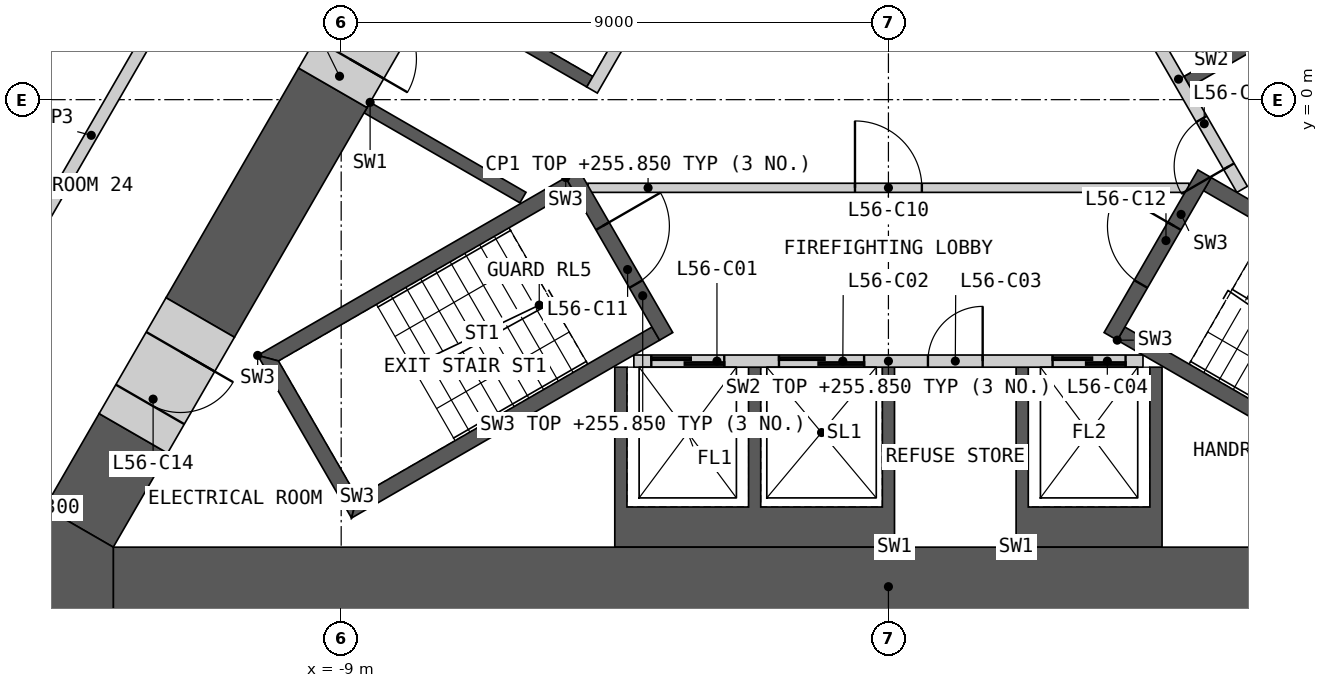
"""IFC4 building model, lengths in metres.
Left out: names, types, materials, properties, quantities, classifications, styles, units other than length and angle.
Written with IfcOpenShell. Run it as: python <this file> out.ifc"""

import sys

from ifc_helpers import new_model, si_unit, direction, frame, frame_2d, origin, place, context, subcontext, project, spatial, polyline, rectangle, outline, extrude, element, fill, save


model = new_model("IFC4")
c1 = context("Model", 3, precision=1e-05, world=origin(), true_north=direction((0.0, 1.0)))
c2 = subcontext(c1, "Body", "Model", "MODEL_VIEW")
j1 = project(units=[si_unit("LENGTHUNIT", "METRE"), si_unit("PLANEANGLEUNIT", "RADIAN")], contexts=[c1])
p1 = place(None, origin())
s1 = spatial("IfcSite", under=j1, at=p1, CompositionType="ELEMENT")
p2 = place(p1, origin())
s2 = spatial("IfcBuilding", under=s1, at=p2, CompositionType="ELEMENT")
p3 = place(p2, frame((0.0, 0.0, 252.6)))
s3 = spatial("IfcBuildingStorey", under=s2, at=p3, CompositionType="ELEMENT", Elevation=252.6)
p4 = place(p3, origin())
e1 = element("IfcWall", 1, at=p4, inside=s3, PredefinedType="SHEAR", context=c2, shape_type="SweptSolid", body=[
    extrude(outline(polyline([(0.1, -7.36), (-4.5, -7.36), (-4.5, -4.4), (-4.3, -4.4), (-4.3, -6.7), (-2.3, -6.7), (-2.3, -4.4), (-2.1, -4.4), (-2.1, -6.7), (-0.1, -6.7), (-0.1, -4.4), (0.1, -4.4), (0.1, -7.36)])), origin(), (0.0, 0.0, 1.0), 3.25),
])
p5 = place(p3, origin())
e2 = element("IfcWall", 2, at=p5, inside=s3, PredefinedType="SHEAR", context=c2, shape_type="SweptSolid", body=[
    extrude(outline(polyline([(2.1, -7.36), (2.1, -4.4), (2.3, -4.4), (2.3, -6.7), (4.3, -6.7), (4.3, -4.4), (4.5, -4.4), (4.5, -7.36), (2.1, -7.36)])), origin(), (0.0, 0.0, 1.0), 3.25),
])
p6 = place(p3, frame((-4.187, -4.3, 0.0), z_axis=(0.0, 0.0, 1.0), x_axis=(1.0, 0.0, 0.0)))
e3 = element("IfcWall", 3, at=p6, inside=s3, PredefinedType="SOLIDWALL", context=c2, shape_type="SweptSolid", body=[
    extrude(rectangle(XDim=8.373, YDim=0.2, at=frame_2d((4.187, 0.0))), origin(), (0.0, 0.0, 1.0), 3.25),
])
p7 = place(p6, frame((0.287, 0.0, 0.0)))
e4 = element("IfcOpeningElement", 4, at=p7, cuts=e3, PredefinedType="OPENING", context=c2, shape_type="SweptSolid", body=[
    extrude(rectangle(XDim=1.2, YDim=2.1, at=frame_2d((0.6, 1.05))), frame((0.0, 0.11, 0.0), z_axis=(0.0, -1.0, 0.0), x_axis=(1.0, 0.0, 0.0)), (0.0, 0.0, 1.0), 0.22),
])
p8 = place(p6, frame((2.387, 0.0, 0.0)))
e5 = element("IfcOpeningElement", 5, at=p8, cuts=e3, PredefinedType="OPENING", context=c2, shape_type="SweptSolid", body=[
    extrude(rectangle(XDim=1.4, YDim=2.1, at=frame_2d((0.7, 1.05))), frame((0.0, 0.11, 0.0), z_axis=(0.0, -1.0, 0.0), x_axis=(1.0, 0.0, 0.0)), (0.0, 0.0, 1.0), 0.22),
])
p9 = place(p6, frame((4.837, 0.0, 0.0)))
e6 = element("IfcOpeningElement", 6, at=p9, cuts=e3, PredefinedType="OPENING", context=c2, shape_type="SweptSolid", body=[
    extrude(rectangle(XDim=0.9, YDim=2.1, at=frame_2d((0.45, 1.05))), frame((0.0, 0.11, 0.0), z_axis=(0.0, -1.0, 0.0), x_axis=(1.0, 0.0, 0.0)), (0.0, 0.0, 1.0), 0.22),
])
p10 = place(p6, frame((6.887, 0.0, 0.0)))
e7 = element("IfcOpeningElement", 7, at=p10, cuts=e3, PredefinedType="OPENING", context=c2, shape_type="SweptSolid", body=[
    extrude(rectangle(XDim=1.2, YDim=2.1, at=frame_2d((0.6, 1.05))), frame((0.0, 0.11, 0.0), z_axis=(0.0, -1.0, 0.0), x_axis=(1.0, 0.0, 0.0)), (0.0, 0.0, 1.0), 0.22),
])
p11 = place(p3, origin())
e8 = element("IfcWall", 8, at=p11, inside=s3, PredefinedType="SHEAR", context=c2, shape_type="SweptSolid", body=[
    extrude(outline(polyline([(7.524, 1.688), (7.131, 1.461), (4.96, 0.208), (4.861, 0.381), (6.852, 1.531), (4.752, 5.169), (2.76, 4.019), (2.66, 4.192), (4.652, 5.342), (3.652, 7.074), (1.66, 5.924), (1.561, 6.097), (3.731, 7.35), (4.124, 7.577), (7.524, 1.688)])), origin(), (0.0, 0.0, 1.0), 3.25),
])
p12 = place(p3, frame((5.817, -1.476, 0.0), z_axis=(0.0, 0.0, 1.0), x_axis=(-0.500002616675, 0.866023893041, 0.0)))
e9 = element("IfcWall", 9, at=p12, inside=s3, PredefinedType="SOLIDWALL", context=c2, shape_type="SweptSolid", body=[
    extrude(rectangle(XDim=8.373, YDim=0.2, at=frame_2d((4.187, 0.0))), origin(), (0.0, 0.0, 1.0), 3.25),
])
p13 = place(p12, frame((0.437, 0.0, 0.0)))
e10 = element("IfcOpeningElement", 10, at=p13, cuts=e9, PredefinedType="OPENING", context=c2, shape_type="SweptSolid", body=[
    extrude(rectangle(XDim=0.9, YDim=2.1, at=frame_2d((0.45, 1.05))), frame((0.0, 0.11, 0.0), z_axis=(0.0, -1.0, 0.0), x_axis=(1.0, 0.0, 0.0)), (0.0, 0.0, 1.0), 0.22),
])
p14 = place(p12, frame((3.737, 0.0, 0.0)))
e11 = element("IfcOpeningElement", 11, at=p14, cuts=e9, PredefinedType="OPENING", context=c2, shape_type="SweptSolid", body=[
    extrude(rectangle(XDim=0.9, YDim=2.1, at=frame_2d((0.45, 1.05))), frame((0.0, 0.11, 0.0), z_axis=(0.0, -1.0, 0.0), x_axis=(1.0, 0.0, 0.0)), (0.0, 0.0, 1.0), 0.22),
])
p15 = place(p12, frame((6.937, 0.0, 0.0)))
e12 = element("IfcOpeningElement", 12, at=p15, cuts=e9, PredefinedType="OPENING", context=c2, shape_type="SweptSolid", body=[
    extrude(rectangle(XDim=1.1, YDim=2.1, at=frame_2d((0.55, 1.05))), frame((0.0, 0.11, 0.0), z_axis=(0.0, -1.0, 0.0), x_axis=(1.0, 0.0, 0.0)), (0.0, 0.0, 1.0), 0.22),
])
p16 = place(p3, origin())
e13 = element("IfcWall", 13, at=p16, inside=s3, PredefinedType="SHEAR", context=c2, shape_type="SweptSolid", body=[
    extrude(outline(polyline([(-7.524, 1.688), (-4.124, 7.577), (-3.731, 7.35), (-1.561, 6.097), (-1.66, 5.924), (-3.652, 7.074), (-4.652, 5.342), (-2.66, 4.192), (-2.76, 4.019), (-4.752, 5.169), (-5.752, 3.437), (-3.76, 2.287), (-3.861, 2.113), (-5.852, 3.263), (-6.852, 1.531), (-4.861, 0.381), (-4.96, 0.208), (-7.131, 1.461), (-7.524, 1.688)])), origin(), (0.0, 0.0, 1.0), 3.25),
])
p17 = place(p3, origin())
e14 = element("IfcWall", 14, at=p17, inside=s3, PredefinedType="SHEAR", context=c2, shape_type="SweptSolid", body=[
    extrude(outline(polyline([(-8.524, -0.044), (-8.131, -0.271), (-5.96, -1.524), (-6.061, -1.697), (-8.231, -0.444), (-8.624, -0.217), (-8.524, -0.044)])), origin(), (0.0, 0.0, 1.0), 3.25),
])
p18 = place(p3, frame((-1.631, 5.776, 0.0), z_axis=(0.0, 0.0, 1.0), x_axis=(-0.499992876559, -0.866029516466, 0.0)))
e15 = element("IfcWall", 15, at=p18, inside=s3, PredefinedType="SOLIDWALL", context=c2, shape_type="SweptSolid", body=[
    extrude(rectangle(XDim=6.486, YDim=0.2, at=frame_2d((3.243, 0.0))), origin(), (0.0, 0.0, 1.0), 3.25),
])
p19 = place(p18, frame((0.337, 0.0, 0.0)))
e16 = element("IfcOpeningElement", 16, at=p19, cuts=e15, PredefinedType="OPENING", context=c2, shape_type="SweptSolid", body=[
    extrude(rectangle(XDim=1.1, YDim=2.1, at=frame_2d((0.55, 1.05))), frame((0.0, 0.11, 0.0), z_axis=(0.0, -1.0, 0.0), x_axis=(1.0, 0.0, 0.0)), (0.0, 0.0, 1.0), 0.22),
])
p20 = place(p18, frame((2.537, 0.0, 0.0)))
e17 = element("IfcOpeningElement", 17, at=p20, cuts=e15, PredefinedType="OPENING", context=c2, shape_type="SweptSolid", body=[
    extrude(rectangle(XDim=1.1, YDim=2.1, at=frame_2d((0.55, 1.05))), frame((0.0, 0.11, 0.0), z_axis=(0.0, -1.0, 0.0), x_axis=(1.0, 0.0, 0.0)), (0.0, 0.0, 1.0), 0.22),
])
p21 = place(p3, frame((-4.941, -1.45, 0.0), z_axis=(0.0, 0.0, 1.0), x_axis=(1.0, 0.0, 0.0)))
e18 = element("IfcWall", 18, at=p21, inside=s3, PredefinedType="PARTITIONING", context=c2, shape_type="SweptSolid", body=[
    extrude(rectangle(XDim=9.882, YDim=0.15, at=frame_2d((4.941, 0.0))), origin(), (0.0, 0.0, 1.0), 3.25),
])
p22 = place(p21, frame((4.391, 0.0, 0.0)))
e19 = element("IfcOpeningElement", 19, at=p22, cuts=e18, PredefinedType="OPENING", context=c2, shape_type="SweptSolid", body=[
    extrude(rectangle(XDim=1.1, YDim=2.1, at=frame_2d((0.55, 1.05))), frame((0.0, 0.085, 0.0), z_axis=(0.0, -1.0, 0.0), x_axis=(1.0, 0.0, 0.0)), (0.0, 0.0, 1.0), 0.17),
])
p23 = place(p3, origin())
e20 = element("IfcWall", 20, at=p23, inside=s3, PredefinedType="SHEAR", context=c2, shape_type="SweptSolid", body=[
    extrude(outline(polyline([(-5.307, -1.281), (-10.374, -4.206), (-10.032, -4.298), (-5.182, -1.498), (-5.307, -1.281)])), origin(), (0.0, 0.0, 1.0), 3.25),
])
p24 = place(p3, origin())
e21 = element("IfcWall", 21, at=p24, inside=s3, PredefinedType="SHEAR", context=c2, shape_type="SweptSolid", body=[
    extrude(outline(polyline([(-10.374, -4.206), (-8.83, -6.881), (-8.738, -6.539), (-10.032, -4.298), (-10.374, -4.206)])), origin(), (0.0, 0.0, 1.0), 3.25),
])
p25 = place(p3, origin())
e22 = element("IfcWall", 22, at=p25, inside=s3, PredefinedType="SHEAR", context=c2, shape_type="SweptSolid", body=[
    extrude(outline(polyline([(-8.738, -6.539), (-8.83, -6.881), (-3.763, -3.956), (-3.888, -3.739), (-8.738, -6.539)])), origin(), (0.0, 0.0, 1.0), 3.25),
])
p26 = place(p3, frame((-5.199, -1.219, 0.0), z_axis=(0.0, 0.0, 1.0), x_axis=(0.499982516597, -0.866035497597, 0.0)))
e23 = element("IfcWall", 23, at=p26, inside=s3, PredefinedType="SHEAR", context=c2, shape_type="SweptSolid", body=[
    extrude(rectangle(XDim=3.088, YDim=0.25, at=frame_2d((1.544, 0.0))), origin(), (0.0, 0.0, 1.0), 3.25),
])
p27 = place(p26, frame((0.994, 0.0, 0.0)))
e24 = element("IfcOpeningElement", 24, at=p27, cuts=e23, PredefinedType="OPENING", context=c2, shape_type="SweptSolid", body=[
    extrude(rectangle(XDim=1.1, YDim=2.1, at=frame_2d((0.55, 1.05))), frame((0.0, 0.135, 0.0), z_axis=(0.0, -1.0, 0.0), x_axis=(1.0, 0.0, 0.0)), (0.0, 0.0, 1.0), 0.27),
])
p28 = place(p3, origin())
e25 = element("IfcWall", 25, at=p28, inside=s3, PredefinedType="SHEAR", context=c2, shape_type="SweptSolid", body=[
    extrude(outline(polyline([(3.763, -3.956), (8.83, -6.881), (8.738, -6.539), (3.888, -3.739), (3.763, -3.956)])), origin(), (0.0, 0.0, 1.0), 3.25),
])
p29 = place(p3, origin())
e26 = element("IfcWall", 26, at=p29, inside=s3, PredefinedType="SHEAR", context=c2, shape_type="SweptSolid", body=[
    extrude(outline(polyline([(10.032, -4.298), (10.374, -4.206), (5.307, -1.281), (5.182, -1.498), (10.032, -4.298)])), origin(), (0.0, 0.0, 1.0), 3.25),
])
p30 = place(p3, frame((3.655, -3.893, 0.0), z_axis=(0.0, 0.0, 1.0), x_axis=(0.499982516597, 0.866035497597, 0.0)))
e27 = element("IfcWall", 27, at=p30, inside=s3, PredefinedType="SHEAR", context=c2, shape_type="SweptSolid", body=[
    extrude(rectangle(XDim=3.088, YDim=0.25, at=frame_2d((1.544, 0.0))), origin(), (0.0, 0.0, 1.0), 3.25),
])
p31 = place(p30, frame((0.994, 0.0, 0.0)))
e28 = element("IfcOpeningElement", 28, at=p31, cuts=e27, PredefinedType="OPENING", context=c2, shape_type="SweptSolid", body=[
    extrude(rectangle(XDim=1.1, YDim=2.1, at=frame_2d((0.55, 1.05))), frame((0.0, 0.135, 0.0), z_axis=(0.0, -1.0, 0.0), x_axis=(1.0, 0.0, 0.0)), (0.0, 0.0, 1.0), 0.27),
])
p32 = place(p3, frame((-12.748, -8.01, 0.0), z_axis=(0.0, 0.0, 1.0), x_axis=(1.0, 0.0, 0.0)))
e29 = element("IfcWall", 29, at=p32, inside=s3, PredefinedType="SHEAR", context=c2, shape_type="SweptSolid", body=[
    extrude(rectangle(XDim=25.497, YDim=1.3, at=frame_2d((12.748, 0.0))), origin(), (0.0, 0.0, 1.0), 3.25),
])
p33 = place(p3, frame((10.081, -1.441, 0.0), z_axis=(0.0, 0.0, 1.0), x_axis=(-0.500006109471, 0.866021876451, 0.0)))
e30 = element("IfcWall", 30, at=p33, inside=s3, PredefinedType="SHEAR", context=c2, shape_type="SweptSolid", body=[
    extrude(rectangle(XDim=11.672, YDim=1.3, at=frame_2d((5.836, 0.0))), origin(), (0.0, 0.0, 1.0), 3.25),
])
p34 = place(p3, frame((-9.137, 0.195, 0.0), z_axis=(0.0, 0.0, 1.0), x_axis=(-0.499985697398, -0.866033661238, 0.0)))
e31 = element("IfcWall", 31, at=p34, inside=s3, PredefinedType="SHEAR", context=c2, shape_type="SweptSolid", body=[
    extrude(rectangle(XDim=4.362, YDim=1.3, at=frame_2d((2.181, 0.0))), origin(), (0.0, 0.0, 1.0), 3.25),
])
p35 = place(p3, frame((-12.418, -5.488, 0.0), z_axis=(0.0, 0.0, 1.0), x_axis=(-0.499931460552, -0.866064971437, 0.0)))
e32 = element("IfcWall", 32, at=p35, inside=s3, PredefinedType="SHEAR", context=c2, shape_type="SweptSolid", body=[
    extrude(rectangle(XDim=1.786, YDim=1.3, at=frame_2d((0.893, 0.0))), origin(), (0.0, 0.0, 1.0), 3.25),
])
p36 = place(p3, origin())
e33 = element("IfcWall", 33, at=p36, inside=s3, PredefinedType="SHEAR", context=c2, shape_type="SweptSolid", body=[
    extrude(outline(polyline([(-13.874, -6.71), (-12.748, -7.36), (-12.748, -8.66), (-15.0, -8.66), (-13.874, -6.71)])), origin(), (0.0, 0.0, 1.0), 3.25),
])
p37 = place(p3, frame((-11.318, -3.583, 0.0), z_axis=(0.0, 0.0, 1.0), x_axis=(-0.50002983664, -0.866008176907, 0.0)))
e34 = element("IfcWall", 34, at=p37, inside=s3, PredefinedType="SHEAR", context=c2, shape_type="SweptSolid", body=[
    extrude(rectangle(XDim=2.2, YDim=1.3, at=frame_2d((1.1, 0.0))), origin(), (0.0, 0.0, 1.0), 3.25),
])
p38 = place(p37, frame((0.65, 0.0, 0.0)))
e35 = element("IfcOpeningElement", 35, at=p38, cuts=e34, PredefinedType="OPENING", context=c2, shape_type="SweptSolid", body=[
    extrude(rectangle(XDim=1.0, YDim=2.1, at=frame_2d((0.5, 1.05))), frame((0.0, 0.66, 0.0), z_axis=(0.0, -1.0, 0.0), x_axis=(1.0, 0.0, 0.0)), (0.0, 0.0, 1.0), 1.32),
])
p39 = place(p3, frame((-8.037, 2.1, 0.0), z_axis=(0.0, 0.0, 1.0), x_axis=(-0.50002983664, -0.866008176907, 0.0)))
e36 = element("IfcWall", 36, at=p39, inside=s3, PredefinedType="SHEAR", context=c2, shape_type="SweptSolid", body=[
    extrude(rectangle(XDim=2.2, YDim=1.3, at=frame_2d((1.1, 0.0))), origin(), (0.0, 0.0, 1.0), 3.25),
])
p40 = place(p39, frame((0.55, 0.0, 0.0)))
e37 = element("IfcOpeningElement", 37, at=p40, cuts=e36, PredefinedType="OPENING", context=c2, shape_type="SweptSolid", body=[
    extrude(rectangle(XDim=1.1, YDim=2.1, at=frame_2d((0.55, 1.05))), frame((0.0, 0.66, 0.0), z_axis=(0.0, -1.0, 0.0), x_axis=(1.0, 0.0, 0.0)), (0.0, 0.0, 1.0), 1.32),
])
p41 = place(p3, frame((5.377, 18.807, 0.0), z_axis=(0.0, 0.0, 1.0), x_axis=(0.499999852422, -0.866025488988, 0.0)))
e38 = element("IfcWall", 38, at=p41, inside=s3, PredefinedType="PARTITIONING", context=c2, shape_type="SweptSolid", body=[
    extrude(rectangle(XDim=27.198, YDim=0.2, at=frame_2d((13.599, 0.0))), origin(), (0.0, 0.0, 1.0), 3.25),
])
p42 = place(p41, frame((25.096, 0.0, 0.0)))
e39 = element("IfcOpeningElement", 39, at=p42, cuts=e38, PredefinedType="OPENING", context=c2, shape_type="SweptSolid", body=[
    extrude(rectangle(XDim=0.95, YDim=2.1, at=frame_2d((0.475, 1.05))), frame((0.0, 0.11, 0.0), z_axis=(0.0, -1.0, 0.0), x_axis=(1.0, 0.0, 0.0)), (0.0, 0.0, 1.0), 0.22),
])
p43 = place(p41, frame((19.122, 0.0, 0.0)))
e40 = element("IfcOpeningElement", 40, at=p43, cuts=e38, PredefinedType="OPENING", context=c2, shape_type="SweptSolid", body=[
    extrude(rectangle(XDim=1.0, YDim=2.1, at=frame_2d((0.5, 1.05))), frame((0.0, 0.11, 0.0), z_axis=(0.0, -1.0, 0.0), x_axis=(1.0, 0.0, 0.0)), (0.0, 0.0, 1.0), 0.22),
])
p44 = place(p41, frame((17.115, 0.0, 0.0)))
e41 = element("IfcOpeningElement", 41, at=p44, cuts=e38, PredefinedType="OPENING", context=c2, shape_type="SweptSolid", body=[
    extrude(rectangle(XDim=1.1, YDim=2.1, at=frame_2d((0.55, 1.05))), frame((0.0, 0.11, 0.0), z_axis=(0.0, -1.0, 0.0), x_axis=(1.0, 0.0, 0.0)), (0.0, 0.0, 1.0), 0.22),
])
p45 = place(p41, frame((0.35, 0.0, 0.0)))
e42 = element("IfcOpeningElement", 42, at=p45, cuts=e38, PredefinedType="OPENING", context=c2, shape_type="SweptSolid", body=[
    extrude(rectangle(XDim=1.1, YDim=2.1, at=frame_2d((0.55, 1.05))), frame((0.0, 0.11, 0.0), z_axis=(0.0, -1.0, 0.0), x_axis=(1.0, 0.0, 0.0)), (0.0, 0.0, 1.0), 0.22),
])
p46 = place(p3, frame((-14.247, -2.556, 0.0), z_axis=(0.0, 0.0, 1.0), x_axis=(0.49998193945, 0.866035830797, 0.0)))
e43 = element("IfcWall", 43, at=p46, inside=s3, PredefinedType="PARTITIONING", context=c2, shape_type="SweptSolid", body=[
    extrude(rectangle(XDim=9.094, YDim=0.2, at=frame_2d((4.547, 0.0))), origin(), (0.0, 0.0, 1.0), 3.25),
])
p47 = place(p3, frame((-15.945, -0.297, 0.0), z_axis=(0.0, 0.0, 1.0), x_axis=(0.499978833458, 0.866037623948, 0.0)))
e44 = element("IfcWall", 44, at=p47, inside=s3, PredefinedType="PARTITIONING", context=c2, shape_type="SweptSolid", body=[
    extrude(rectangle(XDim=6.1, YDim=0.1, at=frame_2d((3.05, 0.0))), origin(), (0.0, 0.0, 1.0), 2.404),
])
p48 = place(p47, frame((4.9, 0.0, 0.0)))
e45 = element("IfcOpeningElement", 45, at=p48, cuts=e44, PredefinedType="OPENING", context=c2, shape_type="SweptSolid", body=[
    extrude(rectangle(XDim=0.95, YDim=2.1, at=frame_2d((0.475, 1.05))), frame((0.0, 0.06, 0.0), z_axis=(0.0, -1.0, 0.0), x_axis=(1.0, 0.0, 0.0)), (0.0, 0.0, 1.0), 0.12),
])
p49 = place(p47, frame((0.25, 0.0, 0.0)))
e46 = element("IfcOpeningElement", 46, at=p49, cuts=e44, PredefinedType="OPENING", context=c2, shape_type="SweptSolid", body=[
    extrude(rectangle(XDim=0.95, YDim=2.1, at=frame_2d((0.475, 1.05))), frame((0.0, 0.06, 0.0), z_axis=(0.0, -1.0, 0.0), x_axis=(1.0, 0.0, 0.0)), (0.0, 0.0, 1.0), 0.12),
])
p50 = place(p3, frame((-15.877, -0.279, 0.0), z_axis=(0.0, 0.0, 1.0), x_axis=(0.866057815567, -0.499943856944, 0.0)))
e47 = element("IfcWall", 47, at=p50, inside=s3, PredefinedType="PARTITIONING", context=c2, shape_type="SweptSolid", body=[
    extrude(rectangle(XDim=2.45, YDim=0.1, at=frame_2d((1.225, 0.0))), origin(), (0.0, 0.0, 1.0), 2.404),
])
p51 = place(p7, origin())
e48 = element("IfcDoor", 48, at=p51, inside=s3, OperationType="SLIDING_TO_LEFT", PredefinedType="DOOR", context=c2, shape_type="SweptSolid", body=[
    extrude(rectangle(XDim=1.2, YDim=2.1, at=frame_2d((0.6, 1.05))), frame((0.0, 0.025, 0.0), z_axis=(0.0, -1.0, 0.0), x_axis=(1.0, 0.0, 0.0)), (0.0, 0.0, 1.0), 0.05),
])
fill(e4, e48)
p52 = place(p8, origin())
e49 = element("IfcDoor", 49, at=p52, inside=s3, OperationType="SLIDING_TO_LEFT", PredefinedType="DOOR", context=c2, shape_type="SweptSolid", body=[
    extrude(rectangle(XDim=1.4, YDim=2.1, at=frame_2d((0.7, 1.05))), frame((0.0, 0.025, 0.0), z_axis=(0.0, -1.0, 0.0), x_axis=(1.0, 0.0, 0.0)), (0.0, 0.0, 1.0), 0.05),
])
fill(e5, e49)
p53 = place(p9, origin())
e50 = element("IfcDoor", 50, at=p53, inside=s3, OperationType="SINGLE_SWING_RIGHT", PredefinedType="DOOR", context=c2, shape_type="SweptSolid", body=[
    extrude(rectangle(XDim=0.9, YDim=2.1, at=frame_2d((0.45, 1.05))), frame((0.0, 0.025, 0.0), z_axis=(0.0, -1.0, 0.0), x_axis=(1.0, 0.0, 0.0)), (0.0, 0.0, 1.0), 0.05),
])
fill(e6, e50)
p54 = place(p10, origin())
e51 = element("IfcDoor", 51, at=p54, inside=s3, OperationType="SLIDING_TO_LEFT", PredefinedType="DOOR", context=c2, shape_type="SweptSolid", body=[
    extrude(rectangle(XDim=1.2, YDim=2.1, at=frame_2d((0.6, 1.05))), frame((0.0, 0.025, 0.0), z_axis=(0.0, -1.0, 0.0), x_axis=(1.0, 0.0, 0.0)), (0.0, 0.0, 1.0), 0.05),
])
fill(e7, e51)
p55 = place(p13, origin())
e52 = element("IfcDoor", 52, at=p55, inside=s3, OperationType="SINGLE_SWING_LEFT", PredefinedType="DOOR", context=c2, shape_type="SweptSolid", body=[
    extrude(rectangle(XDim=0.9, YDim=2.1, at=frame_2d((0.45, 1.05))), frame((0.0, 0.025, 0.0), z_axis=(0.0, -1.0, 0.0), x_axis=(1.0, 0.0, 0.0)), (0.0, 0.0, 1.0), 0.05),
])
fill(e10, e52)
p56 = place(p22, origin())
e53 = element("IfcDoor", 53, at=p56, inside=s3, OperationType="SINGLE_SWING_LEFT", PredefinedType="DOOR", context=c2, shape_type="SweptSolid", body=[
    extrude(rectangle(XDim=1.1, YDim=2.1, at=frame_2d((0.55, 1.05))), frame((0.0, 0.025, 0.0), z_axis=(0.0, -1.0, 0.0), x_axis=(1.0, 0.0, 0.0)), (0.0, 0.0, 1.0), 0.05),
])
fill(e19, e53)
p57 = place(p27, origin())
e54 = element("IfcDoor", 54, at=p57, inside=s3, OperationType="SINGLE_SWING_LEFT", PredefinedType="DOOR", context=c2, shape_type="SweptSolid", body=[
    extrude(rectangle(XDim=1.1, YDim=2.1, at=frame_2d((0.55, 1.05))), frame((0.0, 0.025, 0.0), z_axis=(0.0, -1.0, 0.0), x_axis=(1.0, 0.0, 0.0)), (0.0, 0.0, 1.0), 0.05),
])
fill(e24, e54)
p58 = place(p31, origin())
e55 = element("IfcDoor", 55, at=p58, inside=s3, OperationType="SINGLE_SWING_RIGHT", PredefinedType="DOOR", context=c2, shape_type="SweptSolid", body=[
    extrude(rectangle(XDim=1.1, YDim=2.1, at=frame_2d((0.55, 1.05))), frame((0.0, 0.025, 0.0), z_axis=(0.0, -1.0, 0.0), x_axis=(1.0, 0.0, 0.0)), (0.0, 0.0, 1.0), 0.05),
])
fill(e28, e55)
p59 = place(p38, origin())
e56 = element("IfcDoor", 56, at=p59, inside=s3, OperationType="SINGLE_SWING_LEFT", PredefinedType="DOOR", context=c2, shape_type="SweptSolid", body=[
    extrude(rectangle(XDim=1.0, YDim=2.1, at=frame_2d((0.5, 1.05))), frame((0.0, 0.405, 0.0), z_axis=(0.0, -1.0, 0.0), x_axis=(1.0, 0.0, 0.0)), (0.0, 0.0, 1.0), 0.05),
])
fill(e35, e56)
p60 = place(p40, origin())
e57 = element("IfcDoor", 57, at=p60, inside=s3, OperationType="SINGLE_SWING_RIGHT", PredefinedType="DOOR", context=c2, shape_type="SweptSolid", body=[
    extrude(rectangle(XDim=1.1, YDim=2.1, at=frame_2d((0.55, 1.05))), frame((0.0, 0.405, 0.0), z_axis=(0.0, -1.0, 0.0), x_axis=(1.0, 0.0, 0.0)), (0.0, 0.0, 1.0), 0.05),
])
fill(e37, e57)
save(model, sys.argv[1])
